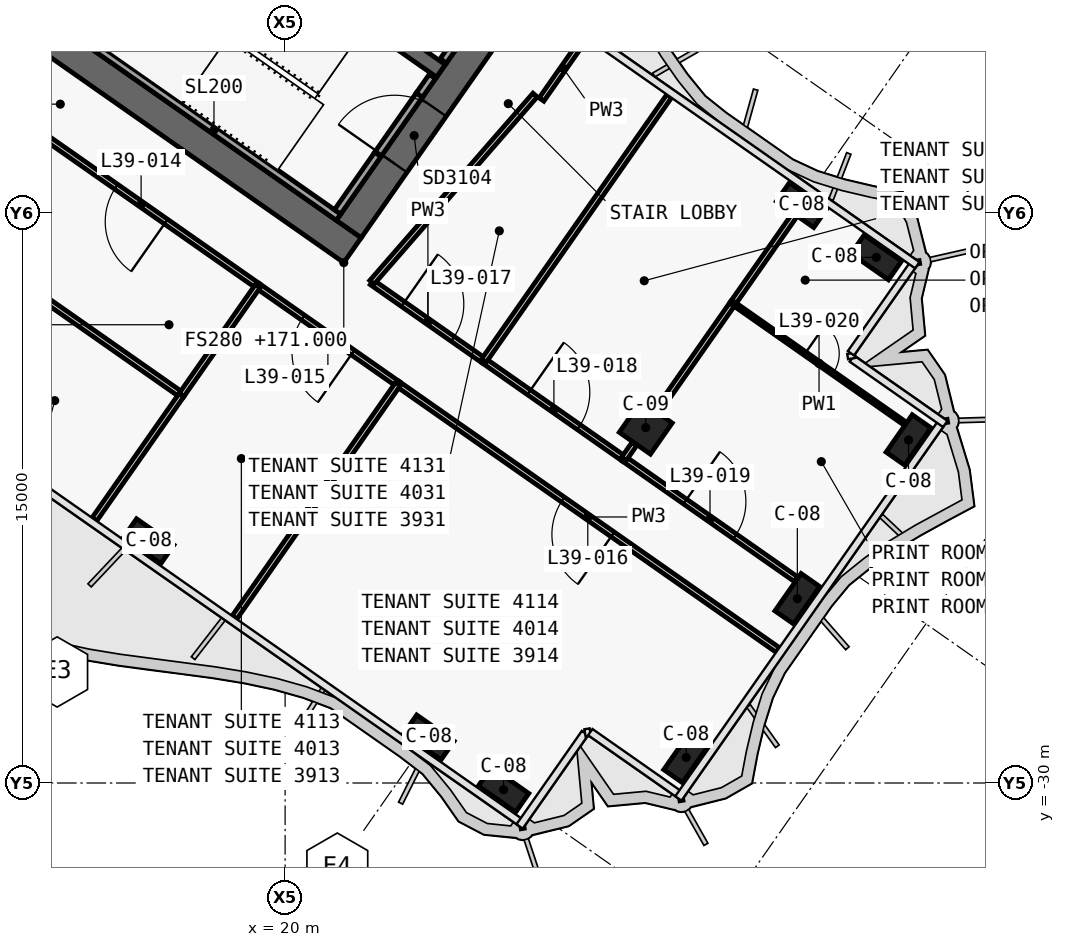
"""IFC4 building model, lengths in metres.
Left out: names, types, materials, properties, quantities, classifications, styles, units other than length and angle.
Written with IfcOpenShell. Run it as: python <this file> out.ifc"""

import sys

from ifc_helpers import new_model, si_unit, direction, frame, frame_2d, origin, origin_2d, place, context, subcontext, project, spatial, polyline, rectangle, outline, extrude, element, fill, save


model = new_model("IFC4")
c1 = context("Model", 3, precision=1e-05, world=origin(), true_north=direction((0.0, 1.0)))
c2 = subcontext(c1, "Body", "Model", "MODEL_VIEW")
j1 = project(units=[si_unit("LENGTHUNIT", "METRE"), si_unit("PLANEANGLEUNIT", "RADIAN")], contexts=[c1])
p1 = place(None, origin())
s1 = spatial("IfcSite", under=j1, at=p1, CompositionType="ELEMENT")
p2 = place(p1, origin())
s2 = spatial("IfcBuilding", under=s1, at=p2, CompositionType="ELEMENT")
p3 = place(p2, frame((0.0, 0.0, 171.0)))
s3 = spatial("IfcBuildingStorey", under=s2, at=p3, CompositionType="ELEMENT", Elevation=171.0)
p4 = place(p3, frame((-0.029, -0.712, 0.0), z_axis=(0.0, 0.0, 1.0), x_axis=(0.819151758019, -0.573576845187, 0.0)))
e1 = element("IfcWall", 1, at=p4, inside=s3, PredefinedType="SHEAR", context=c2, shape_type="SweptSolid", body=[
    extrude(outline(polyline([(26.616, 0.4), (-0.0, 0.4), (0.56, -0.4), (26.616, -0.4), (26.616, 0.4)])), origin(), (0.0, 0.0, 1.0), 3.9),
])
p5 = place(p4, frame((0.966, 0.0, 0.0)))
e2 = element("IfcOpeningElement", 2, at=p5, cuts=e1, PredefinedType="OPENING", context=c2, shape_type="SweptSolid", body=[
    extrude(rectangle(XDim=1.5, YDim=2.1, at=frame_2d((0.75, 1.05))), frame((0.0, 0.41, 0.0), z_axis=(0.0, -1.0, 0.0), x_axis=(1.0, 0.0, 0.0)), (0.0, 0.0, 1.0), 0.82),
])
p6 = place(p4, frame((12.366, 0.0, 0.0)))
e3 = element("IfcOpeningElement", 3, at=p6, cuts=e1, PredefinedType="OPENING", context=c2, shape_type="SweptSolid", body=[
    extrude(rectangle(XDim=1.5, YDim=2.1, at=frame_2d((0.75, 1.05))), frame((0.0, 0.41, 0.0), z_axis=(0.0, -1.0, 0.0), x_axis=(1.0, 0.0, 0.0)), (0.0, 0.0, 1.0), 0.82),
])
p7 = place(p3, frame((21.675, -15.421, 0.0), z_axis=(0.0, 0.0, 1.0), x_axis=(0.573581815061, 0.819148278049, 0.0)))
e4 = element("IfcWall", 4, at=p7, inside=s3, PredefinedType="SHEAR", context=c2, shape_type="SweptSolid", body=[
    extrude(outline(polyline([(9.6, 0.4), (0.0, 0.4), (0.0, -0.4), (9.6, -0.4), (9.6, 0.4)])), origin(), (0.0, 0.0, 1.0), 3.9),
])
p8 = place(p7, frame((6.3, 0.0, 0.0)))
e5 = element("IfcOpeningElement", 5, at=p8, cuts=e4, PredefinedType="OPENING", context=c2, shape_type="SweptSolid", body=[
    extrude(rectangle(XDim=1.8, YDim=2.1, at=frame_2d((0.9, 1.05))), frame((0.0, 0.41, 0.0), z_axis=(0.0, -1.0, 0.0), x_axis=(1.0, 0.0, 0.0)), (0.0, 0.0, 1.0), 0.82),
])
p9 = place(p7, frame((2.1, 0.0, 0.0)))
e6 = element("IfcOpeningElement", 6, at=p9, cuts=e4, PredefinedType="OPENING", context=c2, shape_type="SweptSolid", body=[
    extrude(rectangle(XDim=1.8, YDim=2.1, at=frame_2d((0.9, 1.05))), frame((0.0, 0.41, 0.0), z_axis=(0.0, -1.0, 0.0), x_axis=(1.0, 0.0, 0.0)), (0.0, 0.0, 1.0), 0.82),
])
p10 = place(p3, frame((2.638, 3.768, 0.0), z_axis=(0.0, 0.0, 1.0), x_axis=(0.81915267502, -0.573575535572, 0.0)))
e7 = element("IfcWall", 7, at=p10, inside=s3, PredefinedType="SHEAR", context=c2, shape_type="SweptSolid", body=[
    extrude(outline(polyline([(0.0, 0.2), (0.0, -0.2), (26.2, -0.2), (26.2, 0.2), (0.0, 0.2)])), origin(), (0.0, 0.0, 1.0), 3.9),
])
p11 = place(p10, frame((9.637, 0.0, 0.0)))
e8 = element("IfcOpeningElement", 8, at=p11, cuts=e7, PredefinedType="OPENING", context=c2, shape_type="SweptSolid", body=[
    extrude(rectangle(XDim=1.2, YDim=2.1, at=frame_2d((0.6, 1.05))), frame((0.0, 0.21, 0.0), z_axis=(0.0, -1.0, 0.0), x_axis=(1.0, 0.0, 0.0)), (0.0, 0.0, 1.0), 0.42),
])
p12 = place(p10, frame((11.812, 0.0, 0.0)))
e9 = element("IfcOpeningElement", 9, at=p12, cuts=e7, PredefinedType="OPENING", context=c2, shape_type="SweptSolid", body=[
    extrude(rectangle(XDim=1.2, YDim=2.1, at=frame_2d((0.6, 1.05))), frame((0.0, 0.21, 0.0), z_axis=(0.0, -1.0, 0.0), x_axis=(1.0, 0.0, 0.0)), (0.0, 0.0, 1.0), 0.42),
])
p13 = place(p10, frame((13.988, 0.0, 0.0)))
e10 = element("IfcOpeningElement", 10, at=p13, cuts=e7, PredefinedType="OPENING", context=c2, shape_type="SweptSolid", body=[
    extrude(rectangle(XDim=1.2, YDim=2.1, at=frame_2d((0.6, 1.05))), frame((0.0, 0.21, 0.0), z_axis=(0.0, -1.0, 0.0), x_axis=(1.0, 0.0, 0.0)), (0.0, 0.0, 1.0), 0.42),
])
p14 = place(p10, frame((16.262, 0.0, 0.0)))
e11 = element("IfcOpeningElement", 11, at=p14, cuts=e7, PredefinedType="OPENING", context=c2, shape_type="SweptSolid", body=[
    extrude(rectangle(XDim=1.0, YDim=2.1, at=frame_2d((0.5, 1.05))), frame((0.0, 0.21, 0.0), z_axis=(0.0, -1.0, 0.0), x_axis=(1.0, 0.0, 0.0)), (0.0, 0.0, 1.0), 0.42),
])
for number, where, z_axis, x_axis in (
    (12, (16.41, -23.637, 0.0), (0.0, 0.0, 1.0), (0.819, -0.574, 0.0)),
    (13, (23.782, -28.799, 0.0), (0.0, 0.0, 1.0), (0.819, -0.574, 0.0)),
    (14, (25.748, -30.176, 0.0), (0.0, 0.0, 1.0), (0.819, -0.574, 0.0)),
    (15, (33.591, -14.792, 0.0), (0.0, 0.0, 1.0), (0.819, -0.574, 0.0)),
    (16, (35.556, -16.168, 0.0), (0.0, 0.0, 1.0), (0.819, -0.574, 0.0)),
    (17, (30.553, -29.329, 0.0), (0.0, 0.0, 1.0), (0.574, 0.819, 0.0)),
    (18, (33.479, -25.151, 0.0), (0.0, 0.0, 1.0), (0.574, 0.819, 0.0)),
    (19, (36.404, -20.973, 0.0), (0.0, 0.0, 1.0), (0.574, 0.819, 0.0)),
):
    element("IfcColumn", number, at=place(p3, frame(where, z_axis=z_axis, x_axis=x_axis)), inside=s3, PredefinedType="COLUMN", context=c2, shape_type="SweptSolid", body=[
        extrude(rectangle(XDim=1.2, YDim=0.6, at=origin_2d()), origin(), (0.0, 0.0, 1.0), 3.9),
    ])
p15 = place(p3, frame((29.49, -20.649, 0.0), z_axis=(0.0, 0.0, 1.0), x_axis=(0.819152044289, -0.573576436351, 0.0)))
e20 = element("IfcColumn", 20, at=p15, inside=s3, PredefinedType="COLUMN", context=c2, shape_type="SweptSolid", body=[
    extrude(rectangle(XDim=1.0, YDim=1.0, at=origin_2d()), origin(), (0.0, 0.0, 1.0), 3.9),
])
p16 = place(p3, frame((24.162, -10.998, 0.0), z_axis=(0.0, 0.0, 1.0), x_axis=(0.573612502218, 0.819126789514, 0.0)))
e21 = element("IfcWall", 21, at=p16, inside=s3, PredefinedType="SOLIDWALL", context=c2, shape_type="SweptSolid", body=[
    extrude(rectangle(XDim=1.2, YDim=0.2, at=frame_2d((0.6, 0.0))), origin(), (0.0, 0.0, 1.0), 3.62),
])
p17 = place(p3, frame((14.851, -10.521, 0.0), z_axis=(0.0, 0.0, 1.0), x_axis=(0.819141584393, -0.57359137434, 0.0)))
e22 = element("IfcWall", 22, at=p17, inside=s3, PredefinedType="SOLIDWALL", context=c2, shape_type="SweptSolid", body=[
    extrude(rectangle(XDim=8.0, YDim=0.2, at=frame_2d((4.0, 0.0))), origin(), (0.0, 0.0, 1.0), 3.62),
])
p18 = place(p3, frame((21.38, -14.97, 0.0), z_axis=(0.0, 0.0, 1.0), x_axis=(0.573559770908, 0.819163713305, 0.0)))
e23 = element("IfcWall", 23, at=p18, inside=s3, PredefinedType="SOLIDWALL", context=c2, shape_type="SweptSolid", body=[
    extrude(rectangle(XDim=1.85, YDim=0.2, at=frame_2d((0.925, 0.0))), origin(), (0.0, 0.0, 1.0), 3.62),
])
p19 = place(p3, frame((23.531, -11.898, 0.0), z_axis=(0.0, 0.0, 1.0), x_axis=(0.573708088123, 0.819059844958, 0.0)))
e24 = element("IfcWall", 24, at=p19, inside=s3, PredefinedType="SOLIDWALL", context=c2, shape_type="SweptSolid", body=[
    extrude(rectangle(XDim=0.6, YDim=0.2, at=frame_2d((0.3, 0.0))), origin(), (0.0, 0.0, 1.0), 3.62),
])
p20 = place(p3, frame((22.441, -13.455, 2.15), z_axis=(0.0, 0.0, 1.0), x_axis=(0.573591692345, 0.819141361715, 0.0)))
e25 = element("IfcWall", 25, at=p20, inside=s3, PredefinedType="SOLIDWALL", context=c2, shape_type="SweptSolid", body=[
    extrude(rectangle(XDim=1.9, YDim=0.2, at=frame_2d((0.95, 0.0))), origin(), (0.0, 0.0, 1.0), 1.47),
])
p21 = place(p3, frame((22.283, -16.824, 0.0), z_axis=(0.0, 0.0, 1.0), x_axis=(0.819174552658, -0.573544289726, 0.0)))
e26 = element("IfcWall", 26, at=p21, inside=s3, PredefinedType="PARTITIONING", context=c2, shape_type="SweptSolid", body=[
    extrude(rectangle(XDim=3.599, YDim=0.15, at=frame_2d((1.8, 0.0))), origin(), (0.0, 0.0, 1.0), 3.0),
])
p22 = place(p21, frame((1.0, 0.0, 0.0)))
e27 = element("IfcOpeningElement", 27, at=p22, cuts=e26, PredefinedType="OPENING", context=c2, shape_type="SweptSolid", body=[
    extrude(rectangle(XDim=1.6, YDim=2.1, at=frame_2d((0.8, 1.05))), frame((0.0, 0.085, 0.0), z_axis=(0.0, -1.0, 0.0), x_axis=(1.0, 0.0, 0.0)), (0.0, 0.0, 1.0), 0.17),
])
p23 = place(p3, frame((25.228, -18.886, 0.0), z_axis=(0.0, 0.0, 1.0), x_axis=(0.819165703328, -0.573556928727, 0.0)))
e28 = element("IfcWall", 28, at=p23, inside=s3, PredefinedType="PARTITIONING", context=c2, shape_type="SweptSolid", body=[
    extrude(rectangle(XDim=4.504, YDim=0.15, at=frame_2d((2.252, 0.0))), origin(), (0.0, 0.0, 1.0), 3.0),
])
p24 = place(p23, frame((1.452, 0.0, 0.0)))
e29 = element("IfcOpeningElement", 29, at=p24, cuts=e28, PredefinedType="OPENING", context=c2, shape_type="SweptSolid", body=[
    extrude(rectangle(XDim=1.6, YDim=2.1, at=frame_2d((0.8, 1.05))), frame((0.0, 0.085, 0.0), z_axis=(0.0, -1.0, 0.0), x_axis=(1.0, 0.0, 0.0)), (0.0, 0.0, 1.0), 0.17),
])
p25 = place(p3, frame((28.914, -21.467, 0.0), z_axis=(0.0, 0.0, 1.0), x_axis=(0.819142757108, -0.573589699592, 0.0)))
e30 = element("IfcWall", 30, at=p25, inside=s3, PredefinedType="PARTITIONING", context=c2, shape_type="SweptSolid", body=[
    extrude(rectangle(XDim=5.532, YDim=0.15, at=frame_2d((2.766, 0.0))), origin(), (0.0, 0.0, 1.0), 3.0),
])
p26 = place(p25, frame((1.966, 0.0, 0.0)))
e31 = element("IfcOpeningElement", 31, at=p26, cuts=e30, PredefinedType="OPENING", context=c2, shape_type="SweptSolid", body=[
    extrude(rectangle(XDim=1.6, YDim=2.1, at=frame_2d((0.8, 1.05))), frame((0.0, 0.085, 0.0), z_axis=(0.0, -1.0, 0.0), x_axis=(1.0, 0.0, 0.0)), (0.0, 0.0, 1.0), 0.17),
])
p27 = place(p3, frame((19.284, -16.921, 0.0), z_axis=(0.0, 0.0, 1.0), x_axis=(-0.819153958035, 0.573573703229, 0.0)))
e32 = element("IfcWall", 32, at=p27, inside=s3, PredefinedType="PARTITIONING", context=c2, shape_type="SweptSolid", body=[
    extrude(rectangle(XDim=7.504, YDim=0.15, at=frame_2d((3.752, 0.0))), origin(), (0.0, 0.0, 1.0), 3.0),
])
p28 = place(p27, frame((2.952, 0.0, 0.0)))
e33 = element("IfcOpeningElement", 33, at=p28, cuts=e32, PredefinedType="OPENING", context=c2, shape_type="SweptSolid", body=[
    extrude(rectangle(XDim=1.6, YDim=2.1, at=frame_2d((0.8, 1.05))), frame((0.0, 0.085, 0.0), z_axis=(0.0, -1.0, 0.0), x_axis=(1.0, 0.0, 0.0)), (0.0, 0.0, 1.0), 0.17),
])
p29 = place(p3, frame((22.97, -19.502, 0.0), z_axis=(0.0, 0.0, 1.0), x_axis=(-0.819140235121, 0.573593301221, 0.0)))
e34 = element("IfcWall", 34, at=p29, inside=s3, PredefinedType="PARTITIONING", context=c2, shape_type="SweptSolid", body=[
    extrude(rectangle(XDim=4.504, YDim=0.15, at=frame_2d((2.252, 0.0))), origin(), (0.0, 0.0, 1.0), 3.0),
])
p30 = place(p29, frame((1.452, 0.0, 0.0)))
e35 = element("IfcOpeningElement", 35, at=p30, cuts=e34, PredefinedType="OPENING", context=c2, shape_type="SweptSolid", body=[
    extrude(rectangle(XDim=1.6, YDim=2.1, at=frame_2d((0.8, 1.05))), frame((0.0, 0.085, 0.0), z_axis=(0.0, -1.0, 0.0), x_axis=(1.0, 0.0, 0.0)), (0.0, 0.0, 1.0), 0.17),
])
p31 = place(p3, frame((32.962, -26.499, 0.0), z_axis=(0.0, 0.0, 1.0), x_axis=(-0.819153894559, 0.573573793882, 0.0)))
e36 = element("IfcWall", 36, at=p31, inside=s3, PredefinedType="PARTITIONING", context=c2, shape_type="SweptSolid", body=[
    extrude(rectangle(XDim=12.202, YDim=0.15, at=frame_2d((6.101, 0.0))), origin(), (0.0, 0.0, 1.0), 2.9),
])
p32 = place(p31, frame((5.301, 0.0, 0.0)))
e37 = element("IfcOpeningElement", 37, at=p32, cuts=e36, PredefinedType="OPENING", context=c2, shape_type="SweptSolid", body=[
    extrude(rectangle(XDim=1.6, YDim=2.1, at=frame_2d((0.8, 1.05))), frame((0.0, 0.085, 0.0), z_axis=(0.0, -1.0, 0.0), x_axis=(1.0, 0.0, 0.0)), (0.0, 0.0, 1.0), 0.17),
])
p33 = place(p3, frame((30.105, -11.924, 0.0), z_axis=(0.0, 0.0, 1.0), x_axis=(-0.573572219642, -0.819154996844, 0.0)))
e38 = element("IfcWall", 38, at=p33, inside=s3, PredefinedType="PARTITIONING", context=c2, shape_type="SweptSolid", body=[
    extrude(rectangle(XDim=8.5, YDim=0.15, at=frame_2d((4.25, 0.0))), origin(), (0.0, 0.0, 1.0), 3.0),
])
p34 = place(p3, frame((22.285, -16.825, 0.0), z_axis=(0.0, 0.0, 1.0), x_axis=(0.656781429942, 0.754080999153, 0.0)))
e39 = element("IfcWall", 39, at=p34, inside=s3, PredefinedType="PARTITIONING", context=c2, shape_type="SweptSolid", body=[
    extrude(rectangle(XDim=6.536, YDim=0.15, at=frame_2d((3.268, 0.0))), origin(), (0.0, 0.0, 1.0), 3.0),
])
p35 = place(p3, frame((26.746, -12.014, 0.0), z_axis=(0.0, 0.0, 1.0), x_axis=(0.573568836472, 0.819157365729, 0.0)))
e40 = element("IfcWall", 40, at=p35, inside=s3, PredefinedType="PARTITIONING", context=c2, shape_type="SweptSolid", body=[
    extrude(rectangle(XDim=2.0, YDim=0.15, at=frame_2d((1.0, 0.0))), origin(), (0.0, 0.0, 1.0), 3.0),
])
p36 = place(p3, frame((33.407, -15.054, 0.0), z_axis=(0.0, 0.0, 1.0), x_axis=(-0.573560731169, -0.819163040952, 0.0)))
e41 = element("IfcWall", 41, at=p36, inside=s3, PredefinedType="PARTITIONING", context=c2, shape_type="SweptSolid", body=[
    extrude(rectangle(XDim=2.831, YDim=0.15, at=frame_2d((1.416, 0.0))), origin(), (0.0, 0.0, 1.0), 3.0),
])
p37 = place(p3, frame((31.785, -17.371, 0.0), z_axis=(0.0, 0.0, 1.0), x_axis=(-0.573598798985, -0.819136385349, 0.0)))
e42 = element("IfcWall", 42, at=p37, inside=s3, PredefinedType="PARTITIONING", context=c2, shape_type="SweptSolid", body=[
    extrude(rectangle(XDim=3.482, YDim=0.15, at=frame_2d((1.741, 0.0))), origin(), (0.0, 0.0, 1.0), 3.0),
])
p38 = place(p3, frame((29.191, -21.075, 0.0), z_axis=(0.0, 0.0, 1.0), x_axis=(-0.57322336738, -0.819399152483, 0.0)))
e43 = element("IfcWall", 43, at=p38, inside=s3, PredefinedType="PARTITIONING", context=c2, shape_type="SweptSolid", body=[
    extrude(rectangle(XDim=0.48, YDim=0.15, at=frame_2d((0.24, 0.0))), origin(), (0.0, 0.0, 1.0), 3.0),
])
p39 = place(p3, frame((31.784, -17.371, 0.0), z_axis=(0.0, 0.0, 1.0), x_axis=(0.819144797823, -0.573586785238, 0.0)))
e44 = element("IfcWall", 44, at=p39, inside=s3, PredefinedType="PARTITIONING", context=c2, shape_type="SweptSolid", body=[
    extrude(rectangle(XDim=5.53, YDim=0.1, at=frame_2d((2.765, 0.0))), origin(), (0.0, 0.0, 1.0), 2.9),
])
p40 = place(p39, frame((2.315, 0.0, 0.0)))
e45 = element("IfcOpeningElement", 45, at=p40, cuts=e44, PredefinedType="OPENING", context=c2, shape_type="SweptSolid", body=[
    extrude(rectangle(XDim=0.9, YDim=2.1, at=frame_2d((0.45, 1.05))), frame((0.0, 0.06, 0.0), z_axis=(0.0, -1.0, 0.0), x_axis=(1.0, 0.0, 0.0)), (0.0, 0.0, 1.0), 0.12),
])
p41 = place(p3, frame((11.131, -15.486, 0.0), z_axis=(0.0, 0.0, 1.0), x_axis=(0.819163097304, -0.573560650686, 0.0)))
e46 = element("IfcWall", 46, at=p41, inside=s3, PredefinedType="PARTITIONING", context=c2, shape_type="SweptSolid", body=[
    extrude(rectangle(XDim=7.5, YDim=0.15, at=frame_2d((3.75, 0.0))), origin(), (0.0, 0.0, 1.0), 3.0),
])
p42 = place(p3, frame((17.274, -19.788, 0.0), z_axis=(0.0, 0.0, 1.0), x_axis=(-0.57360163893, -0.819134396675, 0.0)))
e47 = element("IfcWall", 47, at=p42, inside=s3, PredefinedType="PARTITIONING", context=c2, shape_type="SweptSolid", body=[
    extrude(rectangle(XDim=3.999, YDim=0.15, at=frame_2d((2.0, 0.0))), origin(), (0.0, 0.0, 1.0), 2.9),
])
p43 = place(p3, frame((19.282, -16.92, 0.0), z_axis=(0.0, 0.0, 1.0), x_axis=(-0.573598101901, -0.81913687348, 0.0)))
e48 = element("IfcWall", 48, at=p43, inside=s3, PredefinedType="PARTITIONING", context=c2, shape_type="SweptSolid", body=[
    extrude(rectangle(XDim=3.5, YDim=0.15, at=frame_2d((1.75, 0.0))), origin(), (0.0, 0.0, 1.0), 3.62),
])
p44 = place(p3, frame((22.969, -19.501, 0.0), z_axis=(0.0, 0.0, 1.0), x_axis=(-0.573575945067, -0.81915238829, 0.0)))
e49 = element("IfcWall", 49, at=p44, inside=s3, PredefinedType="PARTITIONING", context=c2, shape_type="SweptSolid", body=[
    extrude(rectangle(XDim=7.5, YDim=0.15, at=frame_2d((3.75, 0.0))), origin(), (0.0, 0.0, 1.0), 2.9),
])
p45 = place(p9, origin())
e50 = element("IfcDoor", 50, at=p45, inside=s3, OperationType="DOUBLE_DOOR_SINGLE_SWING", PredefinedType="DOOR", context=c2, shape_type="SweptSolid", body=[
    extrude(rectangle(XDim=1.8, YDim=2.1, at=frame_2d((0.9, 1.05))), frame((0.0, 0.025, 0.0), z_axis=(0.0, -1.0, 0.0), x_axis=(1.0, 0.0, 0.0)), (0.0, 0.0, 1.0), 0.05),
])
fill(e6, e50)
p46 = place(p28, origin())
e51 = element("IfcDoor", 51, at=p46, inside=s3, OperationType="DOUBLE_DOOR_SINGLE_SWING", PredefinedType="DOOR", context=c2, shape_type="SweptSolid", body=[
    extrude(rectangle(XDim=1.6, YDim=2.1, at=frame_2d((0.8, 1.05))), frame((0.0, 0.025, 0.0), z_axis=(0.0, -1.0, 0.0), x_axis=(1.0, 0.0, 0.0)), (0.0, 0.0, 1.0), 0.05),
])
fill(e33, e51)
p47 = place(p30, origin())
e52 = element("IfcDoor", 52, at=p47, inside=s3, OperationType="DOUBLE_DOOR_SINGLE_SWING", PredefinedType="DOOR", context=c2, shape_type="SweptSolid", body=[
    extrude(rectangle(XDim=1.6, YDim=2.1, at=frame_2d((0.8, 1.05))), frame((0.0, 0.025, 0.0), z_axis=(0.0, -1.0, 0.0), x_axis=(1.0, 0.0, 0.0)), (0.0, 0.0, 1.0), 0.05),
])
fill(e35, e52)
p48 = place(p32, origin())
e53 = element("IfcDoor", 53, at=p48, inside=s3, OperationType="DOUBLE_DOOR_SINGLE_SWING", PredefinedType="DOOR", context=c2, shape_type="SweptSolid", body=[
    extrude(rectangle(XDim=1.6, YDim=2.1, at=frame_2d((0.8, 1.05))), frame((0.0, 0.025, 0.0), z_axis=(0.0, -1.0, 0.0), x_axis=(1.0, 0.0, 0.0)), (0.0, 0.0, 1.0), 0.05),
])
fill(e37, e53)
p49 = place(p22, origin())
e54 = element("IfcDoor", 54, at=p49, inside=s3, OperationType="DOUBLE_DOOR_SINGLE_SWING", PredefinedType="DOOR", context=c2, shape_type="SweptSolid", body=[
    extrude(rectangle(XDim=1.6, YDim=2.1, at=frame_2d((0.8, 1.05))), frame((0.0, 0.025, 0.0), z_axis=(0.0, -1.0, 0.0), x_axis=(1.0, 0.0, 0.0)), (0.0, 0.0, 1.0), 0.05),
])
fill(e27, e54)
p50 = place(p24, origin())
e55 = element("IfcDoor", 55, at=p50, inside=s3, OperationType="DOUBLE_DOOR_SINGLE_SWING", PredefinedType="DOOR", context=c2, shape_type="SweptSolid", body=[
    extrude(rectangle(XDim=1.6, YDim=2.1, at=frame_2d((0.8, 1.05))), frame((0.0, 0.025, 0.0), z_axis=(0.0, -1.0, 0.0), x_axis=(1.0, 0.0, 0.0)), (0.0, 0.0, 1.0), 0.05),
])
fill(e29, e55)
p51 = place(p26, origin())
e56 = element("IfcDoor", 56, at=p51, inside=s3, OperationType="DOUBLE_DOOR_SINGLE_SWING", PredefinedType="DOOR", context=c2, shape_type="SweptSolid", body=[
    extrude(rectangle(XDim=1.6, YDim=2.1, at=frame_2d((0.8, 1.05))), frame((0.0, 0.025, 0.0), z_axis=(0.0, -1.0, 0.0), x_axis=(1.0, 0.0, 0.0)), (0.0, 0.0, 1.0), 0.05),
])
fill(e31, e56)
p52 = place(p40, origin())
e57 = element("IfcDoor", 57, at=p52, inside=s3, OperationType="SINGLE_SWING_RIGHT", PredefinedType="DOOR", context=c2, shape_type="SweptSolid", body=[
    extrude(rectangle(XDim=0.9, YDim=2.1, at=frame_2d((0.45, 1.05))), frame((0.0, 0.025, 0.0), z_axis=(0.0, -1.0, 0.0), x_axis=(1.0, 0.0, 0.0)), (0.0, 0.0, 1.0), 0.05),
])
fill(e45, e57)
save(model, sys.argv[1])
